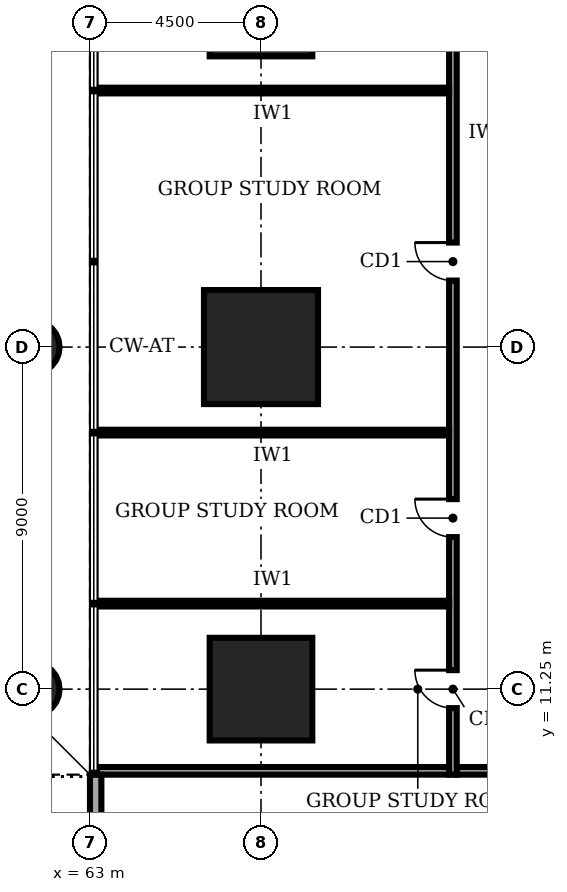
"""IFC4 building model, lengths in metres.
Left out: names, types, materials, properties, quantities, classifications, styles, units other than length and angle.
Written with IfcOpenShell. Run it as: python <this file> out.ifc"""

import sys

from ifc_helpers import new_model, si_unit, direction, frame, frame_2d, origin, origin_2d, place, context, subcontext, project, spatial, rectangle, circle, extrude, element, fill, save


model = new_model("IFC4")
c1 = context("Model", 3, precision=1e-05, world=origin(), true_north=direction((0.0, 1.0)))
c2 = subcontext(c1, "Body", "Model", "MODEL_VIEW")
j1 = project(units=[si_unit("LENGTHUNIT", "METRE"), si_unit("PLANEANGLEUNIT", "RADIAN")], contexts=[c1])
p1 = place(None, origin())
s1 = spatial("IfcSite", under=j1, at=p1, CompositionType="ELEMENT")
p2 = place(p1, origin())
s2 = spatial("IfcBuilding", under=s1, at=p2, CompositionType="ELEMENT")
p3 = place(p2, frame((0.0, 0.0, 11.0)))
s3 = spatial("IfcBuildingStorey", under=s2, at=p3, CompositionType="ELEMENT", Elevation=11.0)
p4 = place(p3, frame((67.5, 11.25, 0.0), z_axis=(0.0, 0.0, 1.0), x_axis=(1.0, 0.0, 0.0)))
e1 = element("IfcColumn", 1, at=p4, inside=s3, PredefinedType="COLUMN", context=c2, shape_type="SweptSolid", body=[
    extrude(rectangle(XDim=2.7, YDim=2.7, at=origin_2d()), origin(), (0.0, 0.0, 1.0), 5.0),
])
p5 = place(p3, frame((67.5, 20.25, 0.0), z_axis=(0.0, 0.0, 1.0), x_axis=(1.0, 0.0, 0.0)))
e2 = element("IfcColumn", 2, at=p5, inside=s3, PredefinedType="COLUMN", context=c2, shape_type="SweptSolid", body=[
    extrude(rectangle(XDim=3.0, YDim=3.0, at=origin_2d()), origin(), (0.0, 0.0, 1.0), 5.0),
])
p6 = place(p3, frame((67.5, 29.25, 0.0), z_axis=(0.0, 0.0, 1.0), x_axis=(1.0, 0.0, 0.0)))
e3 = element("IfcColumn", 3, at=p6, inside=s3, PredefinedType="COLUMN", context=c2, shape_type="SweptSolid", body=[
    extrude(rectangle(XDim=2.7, YDim=2.7, at=origin_2d()), origin(), (0.0, 0.0, 1.0), 5.0),
])
for number, where, z_axis, x_axis in (
    (4, (61.5, 11.25, 0.0), (0.0, 0.0, 1.0), (1.0, 0.0, 0.0)),
    (5, (61.5, 20.25, 0.0), (0.0, 0.0, 1.0), (1.0, 0.0, 0.0)),
):
    element("IfcColumn", number, at=place(p3, frame(where, z_axis=z_axis, x_axis=x_axis)), inside=s3, PredefinedType="COLUMN", context=c2, shape_type="SweptSolid", body=[
        extrude(circle(Radius=0.7, at=origin_2d()), origin(), (0.0, 0.0, 1.0), 5.0),
    ])
p7 = place(p3, frame((72.65, 9.1, 0.0), z_axis=(0.0, 0.0, 1.0), x_axis=(1.0, 0.0, 0.0)))
e6 = element("IfcWall", 6, at=p7, inside=s3, PredefinedType="SOLIDWALL", context=c2, shape_type="SweptSolid", body=[
    extrude(rectangle(XDim=16.9, YDim=0.2, at=frame_2d((8.45, 0.0))), origin(), (0.0, 0.0, 1.0), 4.7),
])
p8 = place(p7, frame((3.175, 0.0, 0.0)))
e7 = element("IfcOpeningElement", 7, at=p8, cuts=e6, PredefinedType="OPENING", context=c2, shape_type="SweptSolid", body=[
    extrude(rectangle(XDim=1.8, YDim=2.1, at=frame_2d((0.9, 1.05))), frame((0.0, 0.11, 0.0), z_axis=(0.0, -1.0, 0.0), x_axis=(1.0, 0.0, 0.0)), (0.0, 0.0, 1.0), 0.22),
])
p9 = place(p7, frame((10.1, 0.0, 0.0)))
e8 = element("IfcOpeningElement", 8, at=p9, cuts=e6, PredefinedType="OPENING", context=c2, shape_type="SweptSolid", body=[
    extrude(rectangle(XDim=1.0, YDim=2.1, at=frame_2d((0.5, 1.05))), frame((0.0, 0.11, 0.0), z_axis=(0.0, -1.0, 0.0), x_axis=(1.0, 0.0, 0.0)), (0.0, 0.0, 1.0), 0.22),
])
p10 = place(p7, frame((13.975, 0.0, 0.0)))
e9 = element("IfcOpeningElement", 9, at=p10, cuts=e6, PredefinedType="OPENING", context=c2, shape_type="SweptSolid", body=[
    extrude(rectangle(XDim=1.8, YDim=2.1, at=frame_2d((0.9, 1.05))), frame((0.0, 0.11, 0.0), z_axis=(0.0, -1.0, 0.0), x_axis=(1.0, 0.0, 0.0)), (0.0, 0.0, 1.0), 0.22),
])
p11 = place(p3, frame((72.55, 31.3, 0.0), z_axis=(0.0, 0.0, 1.0), x_axis=(0.0, -1.0, 0.0)))
e10 = element("IfcWall", 10, at=p11, inside=s3, PredefinedType="SOLIDWALL", context=c2, shape_type="SweptSolid", body=[
    extrude(rectangle(XDim=22.3, YDim=0.2, at=frame_2d((11.15, 0.0))), origin(), (0.0, 0.0, 1.0), 4.7),
])
p12 = place(p11, frame((19.55, 0.0, 0.0)))
e11 = element("IfcOpeningElement", 11, at=p12, cuts=e10, PredefinedType="OPENING", context=c2, shape_type="SweptSolid", body=[
    extrude(rectangle(XDim=1.0, YDim=2.1, at=frame_2d((0.5, 1.05))), frame((0.0, 0.11, 0.0), z_axis=(0.0, -1.0, 0.0), x_axis=(1.0, 0.0, 0.0)), (0.0, 0.0, 1.0), 0.22),
])
p13 = place(p11, frame((15.05, 0.0, 0.0)))
e12 = element("IfcOpeningElement", 12, at=p13, cuts=e10, PredefinedType="OPENING", context=c2, shape_type="SweptSolid", body=[
    extrude(rectangle(XDim=1.0, YDim=2.1, at=frame_2d((0.5, 1.05))), frame((0.0, 0.11, 0.0), z_axis=(0.0, -1.0, 0.0), x_axis=(1.0, 0.0, 0.0)), (0.0, 0.0, 1.0), 0.22),
])
p14 = place(p11, frame((8.3, 0.0, 0.0)))
e13 = element("IfcOpeningElement", 13, at=p14, cuts=e10, PredefinedType="OPENING", context=c2, shape_type="SweptSolid", body=[
    extrude(rectangle(XDim=1.0, YDim=2.1, at=frame_2d((0.5, 1.05))), frame((0.0, 0.11, 0.0), z_axis=(0.0, -1.0, 0.0), x_axis=(1.0, 0.0, 0.0)), (0.0, 0.0, 1.0), 0.22),
])
p15 = place(p11, frame((1.55, 0.0, 0.0)))
e14 = element("IfcOpeningElement", 14, at=p15, cuts=e10, PredefinedType="OPENING", context=c2, shape_type="SweptSolid", body=[
    extrude(rectangle(XDim=1.0, YDim=2.1, at=frame_2d((0.5, 1.05))), frame((0.0, 0.11, 0.0), z_axis=(0.0, -1.0, 0.0), x_axis=(1.0, 0.0, 0.0)), (0.0, 0.0, 1.0), 0.22),
])
p16 = place(p3, frame((63.18, 9.1, 0.0), z_axis=(0.0, 0.0, 1.0), x_axis=(1.0, 0.0, 0.0)))
e15 = element("IfcWall", 15, at=p16, inside=s3, PredefinedType="SOLIDWALL", context=c2, shape_type="SweptSolid", body=[
    extrude(rectangle(XDim=9.27, YDim=0.2, at=frame_2d((4.635, 0.0))), origin(), (0.0, 0.0, 1.0), 4.7),
])
for number, where, z_axis, x_axis in (
    (16, (63.18, 13.5, 0.0), (0.0, 0.0, 1.0), (1.0, 0.0, 0.0)),
    (17, (63.18, 18.0, 0.0), (0.0, 0.0, 1.0), (1.0, 0.0, 0.0)),
    (18, (63.18, 27.0, 0.0), (0.0, 0.0, 1.0), (1.0, 0.0, 0.0)),
):
    element("IfcWall", number, at=place(p3, frame(where, z_axis=z_axis, x_axis=x_axis)), inside=s3, PredefinedType="PARTITIONING", context=c2, shape_type="SweptSolid", body=[
        extrude(rectangle(XDim=9.27, YDim=0.15, at=frame_2d((4.635, 0.0))), origin(), (0.0, 0.0, 1.0), 4.7),
    ])
p17 = place(p3, frame((63.15, 4.97, 0.0), z_axis=(0.0, 0.0, 1.0), x_axis=(0.0, 1.0, 0.0)))
e19 = element("IfcWall", 19, at=p17, inside=s3, PredefinedType="SOLIDWALL", context=c2, shape_type="SweptSolid", body=[
    extrude(rectangle(XDim=4.03, YDim=0.3, at=frame_2d((2.015, 0.0))), origin(), (0.0, 0.0, 1.0), 4.7),
])
p18 = place(p12, frame((1.0, 0.0, 0.0), z_axis=(0.0, 0.0, 1.0), x_axis=(-1.0, 0.0, 0.0)))
e20 = element("IfcDoor", 20, at=p18, inside=s3, OperationType="SINGLE_SWING_RIGHT", PredefinedType="DOOR", context=c2, shape_type="SweptSolid", body=[
    extrude(rectangle(XDim=1.0, YDim=2.1, at=frame_2d((0.5, 1.05))), frame((0.0, 0.025, 0.0), z_axis=(0.0, -1.0, 0.0), x_axis=(1.0, 0.0, 0.0)), (0.0, 0.0, 1.0), 0.05),
])
fill(e11, e20)
p19 = place(p13, frame((1.0, 0.0, 0.0), z_axis=(0.0, 0.0, 1.0), x_axis=(-1.0, 0.0, 0.0)))
e21 = element("IfcDoor", 21, at=p19, inside=s3, OperationType="SINGLE_SWING_RIGHT", PredefinedType="DOOR", context=c2, shape_type="SweptSolid", body=[
    extrude(rectangle(XDim=1.0, YDim=2.1, at=frame_2d((0.5, 1.05))), frame((0.0, 0.025, 0.0), z_axis=(0.0, -1.0, 0.0), x_axis=(1.0, 0.0, 0.0)), (0.0, 0.0, 1.0), 0.05),
])
fill(e12, e21)
p20 = place(p14, frame((1.0, 0.0, 0.0), z_axis=(0.0, 0.0, 1.0), x_axis=(-1.0, 0.0, 0.0)))
e22 = element("IfcDoor", 22, at=p20, inside=s3, OperationType="SINGLE_SWING_RIGHT", PredefinedType="DOOR", context=c2, shape_type="SweptSolid", body=[
    extrude(rectangle(XDim=1.0, YDim=2.1, at=frame_2d((0.5, 1.05))), frame((0.0, 0.025, 0.0), z_axis=(0.0, -1.0, 0.0), x_axis=(1.0, 0.0, 0.0)), (0.0, 0.0, 1.0), 0.05),
])
fill(e13, e22)
save(model, sys.argv[1])
